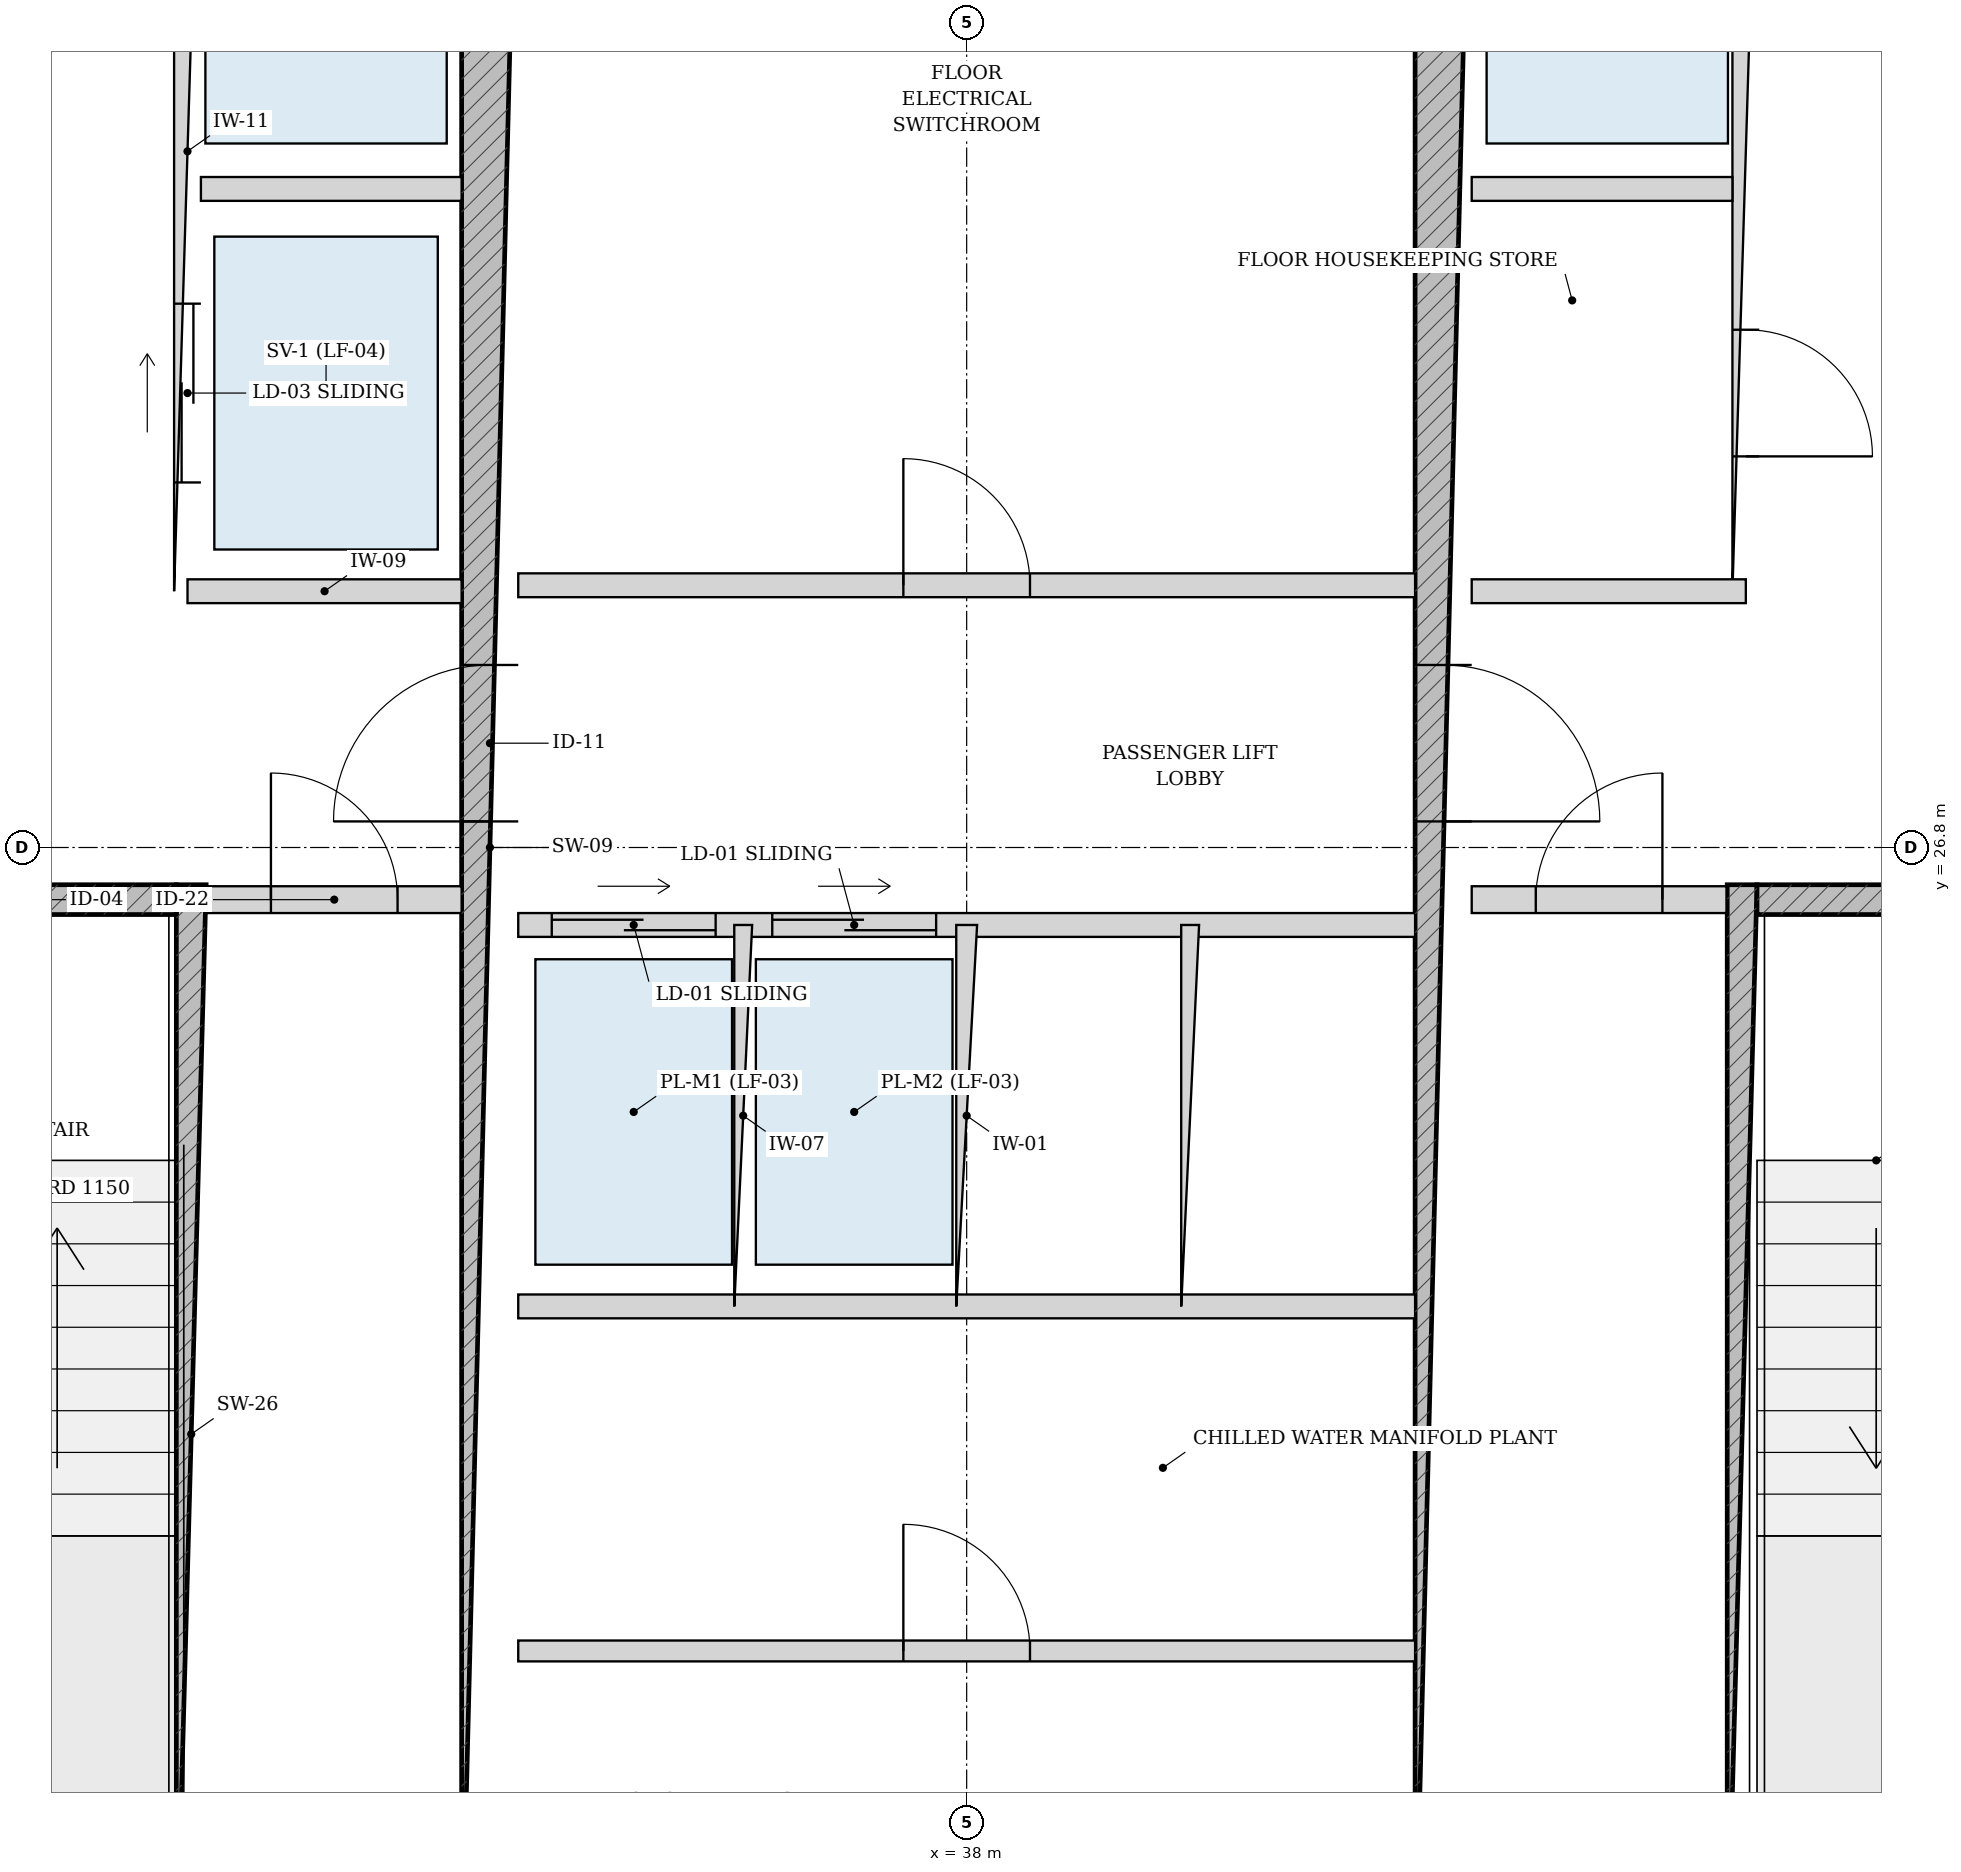
"""IFC4 building model, lengths in metres.
Left out: names, types, materials, properties, quantities, classifications, styles, units other than length and angle.
Written with IfcOpenShell. Run it as: python <this file> out.ifc"""

import sys

from ifc_helpers import new_model, si_unit, direction, frame, frame_2d, origin, place, context, subcontext, project, spatial, rectangle, extrude, source, transform, mapped, element, fill, save


model = new_model("IFC4")
c1 = context("Model", 3, precision=1e-05, world=origin(), true_north=direction((-0.2419218956, 0.970295726276)))
c2 = subcontext(c1, "Body", "Model", "MODEL_VIEW")
j1 = project(units=[si_unit("LENGTHUNIT", "METRE"), si_unit("PLANEANGLEUNIT", "RADIAN")], contexts=[c1])
p1 = place(None, origin())
s1 = spatial("IfcSite", under=j1, at=p1, CompositionType="ELEMENT")
p2 = place(p1, origin())
s2 = spatial("IfcBuilding", under=s1, at=p2, CompositionType="ELEMENT")
p3 = place(p2, frame((0.0, 0.0, 224.5)))
s3 = spatial("IfcBuildingStorey", under=s2, at=p3, CompositionType="ELEMENT", Elevation=224.5)
p4 = place(p3, frame((32.795, 19.175, 0.0), z_axis=(0.0, 0.0, 1.0), x_axis=(0.0, 1.0, 0.0)))
e1 = element("IfcWall", 1, at=p4, inside=s3, PredefinedType="SOLIDWALL", context=c2, shape_type="SweptSolid", body=[
    extrude(rectangle(XDim=7.375, YDim=0.2, at=frame_2d((3.688, 0.0))), origin(), (0.0, 0.0, 1.0), 3.435),
])
p5 = place(p3, frame((29.375, 26.45, 0.0), z_axis=(0.0, 0.0, 1.0), x_axis=(1.0, 0.0, 0.0)))
e2 = element("IfcWall", 2, at=p5, inside=s3, PredefinedType="SOLIDWALL", context=c2, shape_type="SweptSolid", body=[
    extrude(rectangle(XDim=3.32, YDim=0.2, at=frame_2d((1.66, 0.0))), origin(), (0.0, 0.0, 1.0), 3.435),
])
p6 = place(p5, frame((1.185, 0.0, 0.0)))
e3 = element("IfcOpeningElement", 3, at=p6, cuts=e2, PredefinedType="OPENING", context=c2, shape_type="SweptSolid", body=[
    extrude(rectangle(XDim=0.95, YDim=2.15, at=frame_2d((0.475, 1.075))), frame((0.0, 0.11, 0.0), z_axis=(0.0, -1.0, 0.0), x_axis=(1.0, 0.0, 0.0)), (0.0, 0.0, 1.0), 0.22),
])
p7 = place(p3, frame((43.205, 19.175, 0.0), z_axis=(0.0, 0.0, 1.0), x_axis=(0.0, 1.0, 0.0)))
e4 = element("IfcWall", 4, at=p7, inside=s3, PredefinedType="SOLIDWALL", context=c2, shape_type="SweptSolid", body=[
    extrude(rectangle(XDim=7.375, YDim=0.2, at=frame_2d((3.688, 0.0))), origin(), (0.0, 0.0, 1.0), 3.435),
])
p8 = place(p3, frame((43.305, 26.45, 0.0), z_axis=(0.0, 0.0, 1.0), x_axis=(1.0, 0.0, 0.0)))
e5 = element("IfcWall", 5, at=p8, inside=s3, PredefinedType="SOLIDWALL", context=c2, shape_type="SweptSolid", body=[
    extrude(rectangle(XDim=3.32, YDim=0.2, at=frame_2d((1.66, 0.0))), origin(), (0.0, 0.0, 1.0), 3.435),
])
p9 = place(p8, frame((1.185, 0.0, 0.0)))
e6 = element("IfcOpeningElement", 6, at=p9, cuts=e5, PredefinedType="OPENING", context=c2, shape_type="SweptSolid", body=[
    extrude(rectangle(XDim=0.95, YDim=2.15, at=frame_2d((0.475, 1.075))), frame((0.0, 0.11, 0.0), z_axis=(0.0, -1.0, 0.0), x_axis=(1.0, 0.0, 0.0)), (0.0, 0.0, 1.0), 0.22),
])
p10 = place(p3, frame((34.8, 19.175, 0.0), z_axis=(0.0, 0.0, 1.0), x_axis=(0.0, 1.0, 0.0)))
e7 = element("IfcWall", 7, at=p10, inside=s3, PredefinedType="SHEAR", context=c2, shape_type="SweptSolid", body=[
    extrude(rectangle(XDim=15.25, YDim=0.38, at=frame_2d((7.625, 0.0))), origin(), (0.0, 0.0, 1.0), 3.435),
])
p11 = place(p10, frame((7.8, 0.0, 0.0)))
e8 = element("IfcOpeningElement", 8, at=p11, cuts=e7, PredefinedType="OPENING", context=c2, shape_type="SweptSolid", body=[
    extrude(rectangle(XDim=1.05, YDim=2.15, at=frame_2d((0.525, 1.075))), frame((0.0, 0.2, 0.0), z_axis=(0.0, -1.0, 0.0), x_axis=(1.0, 0.0, 0.0)), (0.0, 0.0, 1.0), 0.4),
])
p12 = place(p3, frame((41.2, 19.175, 0.0), z_axis=(0.0, 0.0, 1.0), x_axis=(0.0, 1.0, 0.0)))
e9 = element("IfcWall", 9, at=p12, inside=s3, PredefinedType="SHEAR", context=c2, shape_type="SweptSolid", body=[
    extrude(rectangle(XDim=15.25, YDim=0.38, at=frame_2d((7.625, 0.0))), origin(), (0.0, 0.0, 1.0), 3.435),
])
p13 = place(p12, frame((7.8, 0.0, 0.0)))
e10 = element("IfcOpeningElement", 10, at=p13, cuts=e9, PredefinedType="OPENING", context=c2, shape_type="SweptSolid", body=[
    extrude(rectangle(XDim=1.05, YDim=2.15, at=frame_2d((0.525, 1.075))), frame((0.0, 0.2, 0.0), z_axis=(0.0, -1.0, 0.0), x_axis=(1.0, 0.0, 0.0)), (0.0, 0.0, 1.0), 0.4),
])
p14 = place(p3, frame((32.9, 26.45, 0.0), z_axis=(0.0, 0.0, 1.0), x_axis=(1.0, 0.0, 0.0)))
e11 = element("IfcWall", 11, at=p14, inside=s3, PredefinedType="PARTITIONING", context=c2, shape_type="SweptSolid", body=[
    extrude(rectangle(XDim=1.71, YDim=0.18, at=frame_2d((0.855, 0.0))), origin(), (0.0, 0.0, 1.0), 3.435),
])
p15 = place(p14, frame((0.43, 0.0, 0.0)))
e12 = element("IfcOpeningElement", 12, at=p15, cuts=e11, PredefinedType="OPENING", context=c2, shape_type="SweptSolid", body=[
    extrude(rectangle(XDim=0.85, YDim=2.1, at=frame_2d((0.425, 1.05))), frame((0.0, 0.1, 0.0), z_axis=(0.0, -1.0, 0.0), x_axis=(1.0, 0.0, 0.0)), (0.0, 0.0, 1.0), 0.2),
])
p16 = place(p3, frame((41.39, 26.45, 0.0), z_axis=(0.0, 0.0, 1.0), x_axis=(1.0, 0.0, 0.0)))
e13 = element("IfcWall", 13, at=p16, inside=s3, PredefinedType="PARTITIONING", context=c2, shape_type="SweptSolid", body=[
    extrude(rectangle(XDim=1.71, YDim=0.18, at=frame_2d((0.855, 0.0))), origin(), (0.0, 0.0, 1.0), 3.435),
])
p17 = place(p16, frame((0.43, 0.0, 0.0)))
e14 = element("IfcOpeningElement", 14, at=p17, cuts=e13, PredefinedType="OPENING", context=c2, shape_type="SweptSolid", body=[
    extrude(rectangle(XDim=0.85, YDim=2.1, at=frame_2d((0.425, 1.05))), frame((0.0, 0.1, 0.0), z_axis=(0.0, -1.0, 0.0), x_axis=(1.0, 0.0, 0.0)), (0.0, 0.0, 1.0), 0.2),
])
p18 = place(p3, frame((32.77, 28.52, 0.0), z_axis=(0.0, 0.0, 1.0), x_axis=(0.0, 1.0, 0.0)))
e15 = element("IfcWall", 15, at=p18, inside=s3, PredefinedType="PARTITIONING", context=c2, shape_type="SweptSolid", body=[
    extrude(rectangle(XDim=5.905, YDim=0.18, at=frame_2d((2.953, 0.0))), origin(), (0.0, 0.0, 1.0), 3.435),
])
p19 = place(p18, frame((3.655, 0.0, 0.0)))
e16 = element("IfcOpeningElement", 16, at=p19, cuts=e15, PredefinedType="OPENING", context=c2, shape_type="SweptSolid", body=[
    extrude(rectangle(XDim=1.15, YDim=2.2, at=frame_2d((0.575, 1.1))), frame((0.0, 0.1, 0.0), z_axis=(0.0, -1.0, 0.0), x_axis=(1.0, 0.0, 0.0)), (0.0, 0.0, 1.0), 0.2),
])
p20 = place(p18, frame((0.73, 0.0, 0.0)))
e17 = element("IfcOpeningElement", 17, at=p20, cuts=e15, PredefinedType="OPENING", context=c2, shape_type="SweptSolid", body=[
    extrude(rectangle(XDim=1.2, YDim=2.25, at=frame_2d((0.6, 1.125))), frame((0.0, 0.1, 0.0), z_axis=(0.0, -1.0, 0.0), x_axis=(1.0, 0.0, 0.0)), (0.0, 0.0, 1.0), 0.2),
])
p21 = place(p3, frame((32.86, 31.22, 0.0), z_axis=(0.0, 0.0, 1.0), x_axis=(1.0, 0.0, 0.0)))
e18 = element("IfcWall", 18, at=p21, inside=s3, PredefinedType="PARTITIONING", context=c2, shape_type="SweptSolid", body=[
    extrude(rectangle(XDim=1.75, YDim=0.16, at=frame_2d((0.875, 0.0))), origin(), (0.0, 0.0, 1.0), 3.435),
])
p22 = place(p3, frame((32.77, 28.52, 0.0), z_axis=(0.0, 0.0, 1.0), x_axis=(1.0, 0.0, 0.0)))
e19 = element("IfcWall", 19, at=p22, inside=s3, PredefinedType="PARTITIONING", context=c2, shape_type="SweptSolid", body=[
    extrude(rectangle(XDim=1.84, YDim=0.16, at=frame_2d((0.92, 0.0))), origin(), (0.0, 0.0, 1.0), 3.435),
])
p23 = place(p3, frame((43.23, 28.52, 0.0), z_axis=(0.0, 0.0, 1.0), x_axis=(0.0, 1.0, 0.0)))
e20 = element("IfcWall", 20, at=p23, inside=s3, PredefinedType="PARTITIONING", context=c2, shape_type="SweptSolid", body=[
    extrude(rectangle(XDim=5.905, YDim=0.18, at=frame_2d((2.953, 0.0))), origin(), (0.0, 0.0, 1.0), 3.435),
])
p24 = place(p23, frame((0.905, 0.0, 0.0)))
e21 = element("IfcOpeningElement", 21, at=p24, cuts=e20, PredefinedType="OPENING", context=c2, shape_type="SweptSolid", body=[
    extrude(rectangle(XDim=0.85, YDim=2.1, at=frame_2d((0.425, 1.05))), frame((0.0, 0.1, 0.0), z_axis=(0.0, -1.0, 0.0), x_axis=(1.0, 0.0, 0.0)), (0.0, 0.0, 1.0), 0.2),
])
p25 = place(p23, frame((3.655, 0.0, 0.0)))
e22 = element("IfcOpeningElement", 22, at=p25, cuts=e20, PredefinedType="OPENING", context=c2, shape_type="SweptSolid", body=[
    extrude(rectangle(XDim=1.15, YDim=2.2, at=frame_2d((0.575, 1.1))), frame((0.0, 0.1, 0.0), z_axis=(0.0, -1.0, 0.0), x_axis=(1.0, 0.0, 0.0)), (0.0, 0.0, 1.0), 0.2),
])
p26 = place(p3, frame((41.39, 31.22, 0.0), z_axis=(0.0, 0.0, 1.0), x_axis=(1.0, 0.0, 0.0)))
e23 = element("IfcWall", 23, at=p26, inside=s3, PredefinedType="PARTITIONING", context=c2, shape_type="SweptSolid", body=[
    extrude(rectangle(XDim=1.75, YDim=0.16, at=frame_2d((0.875, 0.0))), origin(), (0.0, 0.0, 1.0), 3.435),
])
p27 = place(p3, frame((41.39, 28.52, 0.0), z_axis=(0.0, 0.0, 1.0), x_axis=(1.0, 0.0, 0.0)))
e24 = element("IfcWall", 24, at=p27, inside=s3, PredefinedType="PARTITIONING", context=c2, shape_type="SweptSolid", body=[
    extrude(rectangle(XDim=1.84, YDim=0.16, at=frame_2d((0.92, 0.0))), origin(), (0.0, 0.0, 1.0), 3.435),
])
p28 = place(p3, frame((34.99, 28.56, 0.0), z_axis=(0.0, 0.0, 1.0), x_axis=(1.0, 0.0, 0.0)))
e25 = element("IfcWall", 25, at=p28, inside=s3, PredefinedType="PARTITIONING", context=c2, shape_type="SweptSolid", body=[
    extrude(rectangle(XDim=6.02, YDim=0.16, at=frame_2d((3.01, 0.0))), origin(), (0.0, 0.0, 1.0), 3.435),
])
p29 = place(p28, frame((2.585, 0.0, 0.0)))
e26 = element("IfcOpeningElement", 26, at=p29, cuts=e25, PredefinedType="OPENING", context=c2, shape_type="SweptSolid", body=[
    extrude(rectangle(XDim=0.85, YDim=2.1, at=frame_2d((0.425, 1.05))), frame((0.0, 0.09, 0.0), z_axis=(0.0, -1.0, 0.0), x_axis=(1.0, 0.0, 0.0)), (0.0, 0.0, 1.0), 0.18),
])
p30 = place(p3, frame((34.99, 26.28, 0.0), z_axis=(0.0, 0.0, 1.0), x_axis=(1.0, 0.0, 0.0)))
e27 = element("IfcWall", 27, at=p30, inside=s3, PredefinedType="PARTITIONING", context=c2, shape_type="SweptSolid", body=[
    extrude(rectangle(XDim=6.02, YDim=0.16, at=frame_2d((3.01, 0.0))), origin(), (0.0, 0.0, 1.0), 3.435),
])
p31 = place(p30, frame((0.225, 0.0, 0.0)))
e28 = element("IfcOpeningElement", 28, at=p31, cuts=e27, PredefinedType="OPENING", context=c2, shape_type="SweptSolid", body=[
    extrude(rectangle(XDim=1.1, YDim=2.2, at=frame_2d((0.55, 1.1))), frame((0.0, 0.09, 0.0), z_axis=(0.0, -1.0, 0.0), x_axis=(1.0, 0.0, 0.0)), (0.0, 0.0, 1.0), 0.18),
])
p32 = place(p30, frame((1.705, 0.0, 0.0)))
e29 = element("IfcOpeningElement", 29, at=p32, cuts=e27, PredefinedType="OPENING", context=c2, shape_type="SweptSolid", body=[
    extrude(rectangle(XDim=1.1, YDim=2.2, at=frame_2d((0.55, 1.1))), frame((0.0, 0.09, 0.0), z_axis=(0.0, -1.0, 0.0), x_axis=(1.0, 0.0, 0.0)), (0.0, 0.0, 1.0), 0.18),
])
p33 = place(p3, frame((34.99, 23.72, 0.0), z_axis=(0.0, 0.0, 1.0), x_axis=(1.0, 0.0, 0.0)))
e30 = element("IfcWall", 30, at=p33, inside=s3, PredefinedType="PARTITIONING", context=c2, shape_type="SweptSolid", body=[
    extrude(rectangle(XDim=6.02, YDim=0.16, at=frame_2d((3.01, 0.0))), origin(), (0.0, 0.0, 1.0), 3.435),
])
p34 = place(p3, frame((36.5, 23.72, 0.0), z_axis=(0.0, 0.0, 1.0), x_axis=(0.0, 1.0, 0.0)))
e31 = element("IfcWall", 31, at=p34, inside=s3, PredefinedType="PARTITIONING", context=c2, shape_type="SweptSolid", body=[
    extrude(rectangle(XDim=2.56, YDim=0.12, at=frame_2d((1.28, 0.0))), origin(), (0.0, 0.0, 1.0), 3.435),
])
p35 = place(p3, frame((38.0, 23.72, 0.0), z_axis=(0.0, 0.0, 1.0), x_axis=(0.0, 1.0, 0.0)))
e32 = element("IfcWall", 32, at=p35, inside=s3, PredefinedType="PARTITIONING", context=c2, shape_type="SweptSolid", body=[
    extrude(rectangle(XDim=2.56, YDim=0.14, at=frame_2d((1.28, 0.0))), origin(), (0.0, 0.0, 1.0), 3.435),
])
p36 = place(p3, frame((39.5, 23.72, 0.0), z_axis=(0.0, 0.0, 1.0), x_axis=(0.0, 1.0, 0.0)))
e33 = element("IfcWall", 33, at=p36, inside=s3, PredefinedType="PARTITIONING", context=c2, shape_type="SweptSolid", body=[
    extrude(rectangle(XDim=2.56, YDim=0.12, at=frame_2d((1.28, 0.0))), origin(), (0.0, 0.0, 1.0), 3.435),
])
p37 = place(p3, frame((34.99, 21.407, 0.0), z_axis=(0.0, 0.0, 1.0), x_axis=(1.0, 0.0, 0.0)))
e34 = element("IfcWall", 34, at=p37, inside=s3, PredefinedType="PARTITIONING", context=c2, shape_type="SweptSolid", body=[
    extrude(rectangle(XDim=6.02, YDim=0.14, at=frame_2d((3.01, 0.0))), origin(), (0.0, 0.0, 1.0), 3.435),
])
p38 = place(p37, frame((2.585, 0.0, 0.0)))
e35 = element("IfcOpeningElement", 35, at=p38, cuts=e34, PredefinedType="OPENING", context=c2, shape_type="SweptSolid", body=[
    extrude(rectangle(XDim=0.85, YDim=2.1, at=frame_2d((0.425, 1.05))), frame((0.0, 0.08, 0.0), z_axis=(0.0, -1.0, 0.0), x_axis=(1.0, 0.0, 0.0)), (0.0, 0.0, 1.0), 0.16),
])
m1 = source(origin(), c2, "Body", "SweptSolid", [
    extrude(rectangle(XDim=1.05, YDim=2.15, at=frame_2d((0.525, 1.075))), frame((0.0, 0.025, 0.0), z_axis=(0.0, -1.0, 0.0), x_axis=(1.0, 0.0, 0.0)), (0.0, 0.0, 1.0), 0.05),
])
p39 = place(p11, origin())
e36 = element("IfcDoor", 36, at=p39, inside=s3, OperationType="SINGLE_SWING_LEFT", PredefinedType="DOOR", context=c2, shape_type="MappedRepresentation", body=[
    mapped(m1, transform((0.0, 0.0, 0.0), scale=1.0)),
])
fill(e8, e36)
p40 = place(p13, frame((1.05, 0.0, 0.0), z_axis=(0.0, 0.0, 1.0), x_axis=(-1.0, 0.0, 0.0)))
e37 = element("IfcDoor", 37, at=p40, inside=s3, OperationType="SINGLE_SWING_RIGHT", PredefinedType="DOOR", context=c2, shape_type="MappedRepresentation", body=[
    mapped(m1, transform((0.0, 0.0, 0.0), scale=1.0)),
])
fill(e10, e37)
m2 = source(origin(), c2, "Body", "SweptSolid", [
    extrude(rectangle(XDim=0.85, YDim=2.1, at=frame_2d((0.425, 1.05))), frame((0.0, 0.025, 0.0), z_axis=(0.0, -1.0, 0.0), x_axis=(1.0, 0.0, 0.0)), (0.0, 0.0, 1.0), 0.05),
])
p41 = place(p15, origin())
e38 = element("IfcDoor", 38, at=p41, inside=s3, OperationType="SINGLE_SWING_LEFT", PredefinedType="DOOR", context=c2, shape_type="MappedRepresentation", body=[
    mapped(m2, transform((0.0, 0.0, 0.0), scale=1.0)),
])
fill(e12, e38)
p42 = place(p17, origin())
e39 = element("IfcDoor", 39, at=p42, inside=s3, OperationType="SINGLE_SWING_RIGHT", PredefinedType="DOOR", context=c2, shape_type="MappedRepresentation", body=[
    mapped(m2, transform((0.0, 0.0, 0.0), scale=1.0)),
])
fill(e14, e39)
p43 = place(p24, frame((0.85, 0.0, 0.0), z_axis=(0.0, 0.0, 1.0), x_axis=(-1.0, 0.0, 0.0)))
e40 = element("IfcDoor", 40, at=p43, inside=s3, OperationType="SINGLE_SWING_RIGHT", PredefinedType="DOOR", context=c2, shape_type="MappedRepresentation", body=[
    mapped(m2, transform((0.0, 0.0, 0.0), scale=1.0)),
])
fill(e21, e40)
p44 = place(p29, origin())
e41 = element("IfcDoor", 41, at=p44, inside=s3, OperationType="SINGLE_SWING_LEFT", PredefinedType="DOOR", context=c2, shape_type="MappedRepresentation", body=[
    mapped(m2, transform((0.0, 0.0, 0.0), scale=1.0)),
])
fill(e26, e41)
p45 = place(p38, origin())
e42 = element("IfcDoor", 42, at=p45, inside=s3, OperationType="SINGLE_SWING_LEFT", PredefinedType="DOOR", context=c2, shape_type="MappedRepresentation", body=[
    mapped(m2, transform((0.0, 0.0, 0.0), scale=1.0)),
])
fill(e35, e42)
m3 = source(origin(), c2, "Body", "SweptSolid", [
    extrude(rectangle(XDim=1.2, YDim=2.25, at=frame_2d((0.6, 1.125))), frame((0.0, 0.025, 0.0), z_axis=(0.0, -1.0, 0.0), x_axis=(1.0, 0.0, 0.0)), (0.0, 0.0, 1.0), 0.05),
])
p46 = place(p20, origin())
e43 = element("IfcDoor", 43, at=p46, inside=s3, OperationType="DOUBLE_DOOR_SLIDING", PredefinedType="DOOR", context=c2, shape_type="MappedRepresentation", body=[
    mapped(m3, transform((0.0, 0.0, 0.0), scale=1.0)),
])
fill(e17, e43)
m4 = source(origin(), c2, "Body", "SweptSolid", [
    extrude(rectangle(XDim=1.1, YDim=2.2, at=frame_2d((0.55, 1.1))), frame((0.0, 0.025, 0.0), z_axis=(0.0, -1.0, 0.0), x_axis=(1.0, 0.0, 0.0)), (0.0, 0.0, 1.0), 0.05),
])
p47 = place(p31, origin())
e44 = element("IfcDoor", 44, at=p47, inside=s3, OperationType="DOUBLE_DOOR_SLIDING", PredefinedType="DOOR", context=c2, shape_type="MappedRepresentation", body=[
    mapped(m4, transform((0.0, 0.0, 0.0), scale=1.0)),
])
fill(e28, e44)
p48 = place(p32, origin())
e45 = element("IfcDoor", 45, at=p48, inside=s3, OperationType="DOUBLE_DOOR_SLIDING", PredefinedType="DOOR", context=c2, shape_type="MappedRepresentation", body=[
    mapped(m4, transform((0.0, 0.0, 0.0), scale=1.0)),
])
fill(e29, e45)
save(model, sys.argv[1])
